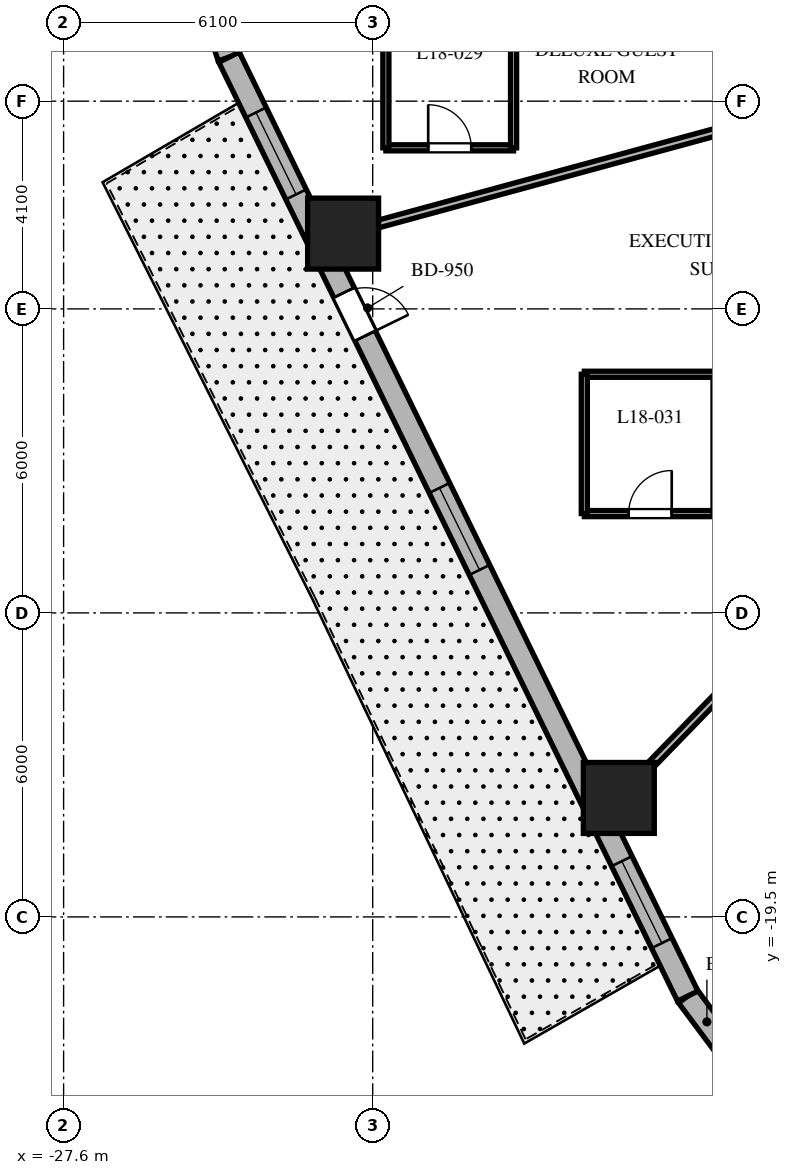
"""IFC4 building model, lengths in metres.
Left out: names, types, materials, properties, quantities, classifications, styles, units other than length and angle.
Written with IfcOpenShell. Run it as: python <this file> out.ifc"""

import sys

from ifc_helpers import new_model, si_unit, direction, frame, frame_2d, origin, origin_2d, place, context, subcontext, project, spatial, rectangle, extrude, element, fill, save


model = new_model("IFC4")
c1 = context("Model", 3, precision=1e-05, world=origin(), true_north=direction((0.0, 1.0)))
c2 = subcontext(c1, "Body", "Model", "MODEL_VIEW")
j1 = project(units=[si_unit("LENGTHUNIT", "METRE"), si_unit("PLANEANGLEUNIT", "RADIAN")], contexts=[c1])
p1 = place(None, origin())
s1 = spatial("IfcSite", under=j1, at=p1, CompositionType="ELEMENT")
p2 = place(p1, origin())
s2 = spatial("IfcBuilding", under=s1, at=p2, CompositionType="ELEMENT")
p3 = place(p2, frame((0.0, 0.0, 78.6)))
s3 = spatial("IfcBuildingStorey", under=s2, at=p3, CompositionType="ELEMENT", Elevation=78.6)
for number, where, z_axis, x_axis in (
    (1, (-22.084, -6.014, 0.0), (0.0, 0.0, 1.0), (1.0, 0.0, 0.0)),
    (2, (-16.643, -17.152, 0.0), (0.0, 0.0, 1.0), (1.0, 0.0, 0.0)),
):
    element("IfcColumn", number, at=place(p3, frame(where, z_axis=z_axis, x_axis=x_axis)), inside=s3, PredefinedType="COLUMN", context=c2, shape_type="SweptSolid", body=[
        extrude(rectangle(XDim=1.4, YDim=1.4, at=origin_2d()), origin(), (0.0, 0.0, 1.0), 3.7),
    ])
p4 = place(p3, frame((-15.284, -21.062, 0.0), z_axis=(0.0, 0.0, 1.0), x_axis=(0.597595366449, -0.801797841104, 0.0)))
e3 = element("IfcWall", 3, at=p4, inside=s3, PredefinedType="SOLIDWALL", context=c2, shape_type="SweptSolid", body=[
    extrude(rectangle(XDim=1.269, YDim=0.45, at=frame_2d((0.634, 0.0))), origin(), (0.0, 0.0, 1.0), 3.4),
])
p5 = place(p3, frame((-24.621, -1.682, 0.0), z_axis=(0.0, 0.0, 1.0), x_axis=(0.317697451681, -0.948192137278, 0.0)))
e4 = element("IfcWall", 4, at=p5, inside=s3, PredefinedType="SOLIDWALL", context=c2, shape_type="SweptSolid", body=[
    extrude(rectangle(XDim=0.897, YDim=0.45, at=frame_2d((0.448, 0.0))), origin(), (0.0, 0.0, 1.0), 3.4),
])
p6 = place(p3, frame((-24.336, -2.532, 0.0), z_axis=(0.0, 0.0, 1.0), x_axis=(0.438931326393, -0.898520612291, 0.0)))
e5 = element("IfcWall", 5, at=p6, inside=s3, PredefinedType="SOLIDWALL", context=c2, shape_type="SweptSolid", body=[
    extrude(rectangle(XDim=20.623, YDim=0.45, at=frame_2d((10.312, 0.0))), origin(), (0.0, 0.0, 1.0), 3.4),
])
p7 = place(p6, frame((5.171, 0.0, 0.0)))
e6 = element("IfcOpeningElement", 6, at=p7, cuts=e5, PredefinedType="OPENING", context=c2, shape_type="SweptSolid", body=[
    extrude(rectangle(XDim=0.95, YDim=2.15, at=frame_2d((0.475, 1.075))), frame((0.0, 0.235, 0.0), z_axis=(0.0, -1.0, 0.0), x_axis=(1.0, 0.0, 0.0)), (0.0, 0.0, 1.0), 0.47),
])
p8 = place(p6, frame((1.214, 0.0, 0.8)))
e7 = element("IfcOpeningElement", 7, at=p8, cuts=e5, PredefinedType="OPENING", context=c2, shape_type="SweptSolid", body=[
    extrude(rectangle(XDim=1.8, YDim=1.8, at=frame_2d((0.9, 0.9))), frame((0.0, 0.235, 0.0), z_axis=(0.0, -1.0, 0.0), x_axis=(1.0, 0.0, 0.0)), (0.0, 0.0, 1.0), 0.47),
])
p9 = place(p6, frame((9.462, 0.0, 0.8)))
e8 = element("IfcOpeningElement", 8, at=p9, cuts=e5, PredefinedType="OPENING", context=c2, shape_type="SweptSolid", body=[
    extrude(rectangle(XDim=1.8, YDim=1.8, at=frame_2d((0.9, 0.9))), frame((0.0, 0.235, 0.0), z_axis=(0.0, -1.0, 0.0), x_axis=(1.0, 0.0, 0.0)), (0.0, 0.0, 1.0), 0.47),
])
p10 = place(p6, frame((17.66, 0.0, 0.8)))
e9 = element("IfcOpeningElement", 9, at=p10, cuts=e5, PredefinedType="OPENING", context=c2, shape_type="SweptSolid", body=[
    extrude(rectangle(XDim=1.8, YDim=1.8, at=frame_2d((0.9, 0.9))), frame((0.0, 0.235, 0.0), z_axis=(0.0, -1.0, 0.0), x_axis=(1.0, 0.0, 0.0)), (0.0, 0.0, 1.0), 0.47),
])
p11 = place(p3, frame((-11.35, -3.091, 0.0), z_axis=(0.0, 0.0, 1.0), x_axis=(-0.964859685283, -0.262765651704, 0.0)))
e10 = element("IfcWall", 10, at=p11, inside=s3, PredefinedType="PARTITIONING", context=c2, shape_type="SweptSolid", body=[
    extrude(rectangle(XDim=11.629, YDim=0.15, at=frame_2d((5.814, 0.0))), origin(), (0.0, 0.0, 1.0), 2.54),
])
p12 = place(p3, frame((-9.558, -9.85, 0.0), z_axis=(0.0, 0.0, 1.0), x_axis=(-0.69638346089, -0.717669893056, 0.0)))
e11 = element("IfcWall", 11, at=p12, inside=s3, PredefinedType="PARTITIONING", context=c2, shape_type="SweptSolid", body=[
    extrude(rectangle(XDim=10.701, YDim=0.15, at=frame_2d((5.351, 0.0))), origin(), (0.0, 0.0, 1.0), 2.54),
])
p13 = place(p3, frame((-21.24, -4.321, 0.0), z_axis=(0.0, 0.0, 1.0), x_axis=(1.0, 0.0, 0.0)))
e12 = element("IfcWall", 12, at=p13, inside=s3, PredefinedType="PARTITIONING", context=c2, shape_type="SweptSolid", body=[
    extrude(rectangle(XDim=2.52, YDim=0.12, at=frame_2d((1.26, 0.0))), origin(), (0.0, 0.0, 1.0), 3.4),
])
p14 = place(p13, frame((0.835, 0.0, 0.0)))
e13 = element("IfcOpeningElement", 13, at=p14, cuts=e12, PredefinedType="OPENING", context=c2, shape_type="SweptSolid", body=[
    extrude(rectangle(XDim=0.85, YDim=2.03, at=frame_2d((0.425, 1.015))), frame((0.0, 0.07, 0.0), z_axis=(0.0, -1.0, 0.0), x_axis=(1.0, 0.0, 0.0)), (0.0, 0.0, 1.0), 0.14),
])
for number, where, z_axis, x_axis in (
    (14, (-18.72, -4.321, 0.0), (0.0, 0.0, 1.0), (0.0, 1.0, 0.0)),
    (15, (-21.24, -1.641, 0.0), (0.0, 0.0, 1.0), (0.0, -1.0, 0.0)),
):
    element("IfcWall", number, at=place(p3, frame(where, z_axis=z_axis, x_axis=x_axis)), inside=s3, PredefinedType="PARTITIONING", context=c2, shape_type="SweptSolid", body=[
        extrude(rectangle(XDim=2.68, YDim=0.12, at=frame_2d((1.34, 0.0))), origin(), (0.0, 0.0, 1.0), 3.4),
    ])
p15 = place(p3, frame((-17.324, -11.54, 0.0), z_axis=(0.0, 0.0, 1.0), x_axis=(1.0, 0.0, 0.0)))
e16 = element("IfcWall", 16, at=p15, inside=s3, PredefinedType="PARTITIONING", context=c2, shape_type="SweptSolid", body=[
    extrude(rectangle(XDim=2.6, YDim=0.12, at=frame_2d((1.3, 0.0))), origin(), (0.0, 0.0, 1.0), 2.927),
])
p16 = place(p15, frame((0.875, 0.0, 0.0)))
e17 = element("IfcOpeningElement", 17, at=p16, cuts=e16, PredefinedType="OPENING", context=c2, shape_type="SweptSolid", body=[
    extrude(rectangle(XDim=0.85, YDim=2.03, at=frame_2d((0.425, 1.015))), frame((0.0, 0.07, 0.0), z_axis=(0.0, -1.0, 0.0), x_axis=(1.0, 0.0, 0.0)), (0.0, 0.0, 1.0), 0.14),
])
p17 = place(p3, frame((-14.724, -8.79, 0.0), z_axis=(0.0, 0.0, 1.0), x_axis=(-1.0, 0.0, 0.0)))
e18 = element("IfcWall", 18, at=p17, inside=s3, PredefinedType="PARTITIONING", context=c2, shape_type="SweptSolid", body=[
    extrude(rectangle(XDim=2.6, YDim=0.12, at=frame_2d((1.3, 0.0))), origin(), (0.0, 0.0, 1.0), 2.927),
])
p18 = place(p3, frame((-17.324, -8.79, 0.0), z_axis=(0.0, 0.0, 1.0), x_axis=(0.0, -1.0, 0.0)))
e19 = element("IfcWall", 19, at=p18, inside=s3, PredefinedType="PARTITIONING", context=c2, shape_type="SweptSolid", body=[
    extrude(rectangle(XDim=2.75, YDim=0.12, at=frame_2d((1.375, 0.0))), origin(), (0.0, 0.0, 1.0), 3.4),
])
p19 = place(p7, origin())
e20 = element("IfcDoor", 20, at=p19, inside=s3, OperationType="SINGLE_SWING_RIGHT", PredefinedType="DOOR", context=c2, shape_type="SweptSolid", body=[
    extrude(rectangle(XDim=0.95, YDim=2.15, at=frame_2d((0.475, 1.075))), frame((0.0, 0.025, 0.0), z_axis=(0.0, -1.0, 0.0), x_axis=(1.0, 0.0, 0.0)), (0.0, 0.0, 1.0), 0.05),
])
fill(e6, e20)
p20 = place(p8, origin())
e21 = element("IfcWindow", 21, at=p20, inside=s3, PartitioningType="SINGLE_PANEL", PredefinedType="WINDOW", context=c2, shape_type="SweptSolid", body=[
    extrude(rectangle(XDim=1.8, YDim=1.8, at=frame_2d((0.9, 0.9))), frame((0.0, 0.03, 0.0), z_axis=(0.0, -1.0, 0.0), x_axis=(1.0, 0.0, 0.0)), (0.0, 0.0, 1.0), 0.06),
])
fill(e7, e21)
p21 = place(p9, origin())
e22 = element("IfcWindow", 22, at=p21, inside=s3, PartitioningType="SINGLE_PANEL", PredefinedType="WINDOW", context=c2, shape_type="SweptSolid", body=[
    extrude(rectangle(XDim=1.8, YDim=1.8, at=frame_2d((0.9, 0.9))), frame((0.0, 0.03, 0.0), z_axis=(0.0, -1.0, 0.0), x_axis=(1.0, 0.0, 0.0)), (0.0, 0.0, 1.0), 0.06),
])
fill(e8, e22)
p22 = place(p10, origin())
e23 = element("IfcWindow", 23, at=p22, inside=s3, PartitioningType="SINGLE_PANEL", PredefinedType="WINDOW", context=c2, shape_type="SweptSolid", body=[
    extrude(rectangle(XDim=1.8, YDim=1.8, at=frame_2d((0.9, 0.9))), frame((0.0, 0.03, 0.0), z_axis=(0.0, -1.0, 0.0), x_axis=(1.0, 0.0, 0.0)), (0.0, 0.0, 1.0), 0.06),
])
fill(e9, e23)
p23 = place(p14, origin())
e24 = element("IfcDoor", 24, at=p23, inside=s3, OperationType="SINGLE_SWING_LEFT", PredefinedType="DOOR", context=c2, shape_type="SweptSolid", body=[
    extrude(rectangle(XDim=0.85, YDim=2.03, at=frame_2d((0.425, 1.015))), frame((0.0, 0.025, 0.0), z_axis=(0.0, -1.0, 0.0), x_axis=(1.0, 0.0, 0.0)), (0.0, 0.0, 1.0), 0.05),
])
fill(e13, e24)
p24 = place(p16, origin())
e25 = element("IfcDoor", 25, at=p24, inside=s3, OperationType="SINGLE_SWING_RIGHT", PredefinedType="DOOR", context=c2, shape_type="SweptSolid", body=[
    extrude(rectangle(XDim=0.85, YDim=2.03, at=frame_2d((0.425, 1.015))), frame((0.0, 0.025, 0.0), z_axis=(0.0, -1.0, 0.0), x_axis=(1.0, 0.0, 0.0)), (0.0, 0.0, 1.0), 0.05),
])
fill(e17, e25)
save(model, sys.argv[1])
